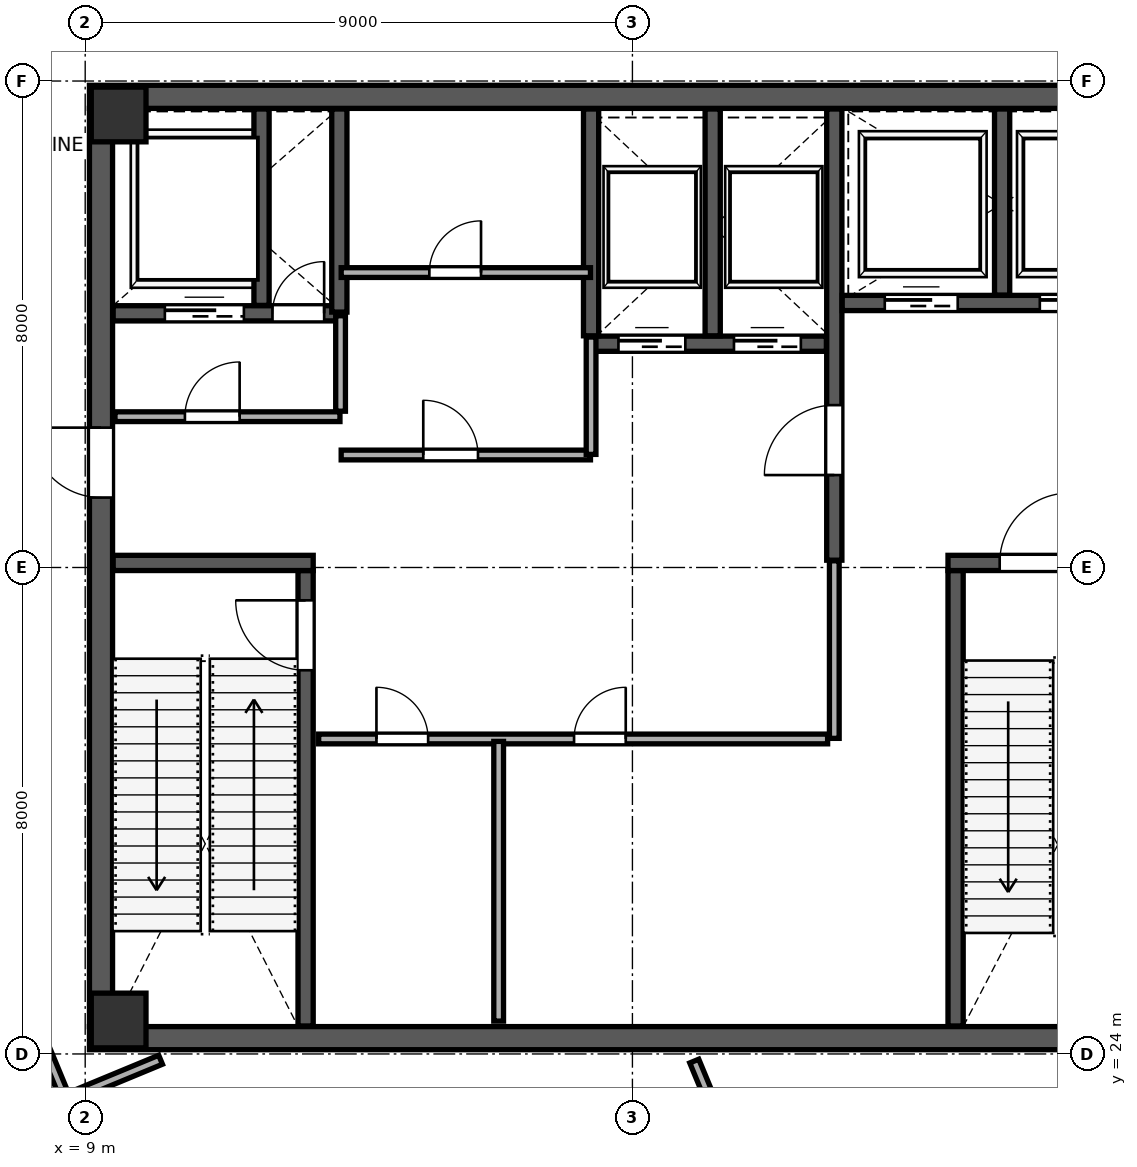
"""IFC4 building model, lengths in metres.
Left out: names, types, materials, properties, quantities, classifications, styles, units other than length and angle.
Written with IfcOpenShell. Run it as: python <this file> out.ifc"""

import sys

from ifc_helpers import new_model, si_unit, direction, frame, frame_2d, origin, origin_2d, place, context, subcontext, project, spatial, rectangle, extrude, source, transform, mapped, element, fill, save


model = new_model("IFC4")
c1 = context("Model", 3, precision=1e-05, world=origin(), true_north=direction((0.0, 1.0)))
c2 = subcontext(c1, "Body", "Model", "MODEL_VIEW")
j1 = project(units=[si_unit("LENGTHUNIT", "METRE"), si_unit("PLANEANGLEUNIT", "RADIAN")], contexts=[c1])
p1 = place(None, origin())
s1 = spatial("IfcSite", under=j1, at=p1, CompositionType="ELEMENT")
p2 = place(p1, origin())
s2 = spatial("IfcBuilding", under=s1, at=p2, CompositionType="ELEMENT")
p3 = place(p2, frame((0.0, 0.0, 349.2)))
s3 = spatial("IfcBuildingStorey", under=s2, at=p3, CompositionType="ELEMENT", Elevation=349.2)
m1 = source(origin(), c2, "Body", "SweptSolid", [
    extrude(rectangle(XDim=0.9, YDim=0.9, at=origin_2d()), origin(), (0.0, 0.0, 1.0), 5.999),
])
for number, where, z_axis, x_axis in (
    (1, (9.55, 24.55, 0.001), (0.0, 0.0, 1.0), (1.0, 0.0, 0.0)),
    (2, (9.55, 39.45, 0.001), (0.0, 0.0, 1.0), (1.0, 0.0, 0.0)),
):
    element("IfcColumn", number, at=place(p3, frame(where, z_axis=z_axis, x_axis=x_axis)), inside=s3, PredefinedType="COLUMN", context=c2, shape_type="MappedRepresentation", body=[
        mapped(m1, transform((0.0, 0.0, 0.0), scale=1.0)),
    ])
p4 = place(p3, frame((9.26, 24.45, 0.0), z_axis=(0.0, 0.0, 1.0), x_axis=(0.0, 1.0, 0.0)))
e3 = element("IfcWall", 3, at=p4, inside=s3, PredefinedType="SHEAR", context=c2, shape_type="SweptSolid", body=[
    extrude(rectangle(XDim=15.1, YDim=0.38, at=frame_2d((7.55, 0.0))), origin(), (0.0, 0.0, 1.0), 5.76),
])
p5 = place(p4, frame((8.7, 0.0, 0.0)))
e4 = element("IfcOpeningElement", 4, at=p5, cuts=e3, PredefinedType="OPENING", context=c2, shape_type="SweptSolid", body=[
    extrude(rectangle(XDim=1.15, YDim=2.2, at=frame_2d((0.575, 1.1))), frame((0.0, 0.2, 0.0), z_axis=(0.0, -1.0, 0.0), x_axis=(1.0, 0.0, 0.0)), (0.0, 0.0, 1.0), 0.4),
])
for number, where, z_axis, x_axis in (
    (5, (9.07, 24.26, 0.0), (0.0, 0.0, 1.0), (1.0, 0.0, 0.0)),
    (6, (9.07, 39.74, 0.0), (0.0, 0.0, 1.0), (1.0, 0.0, 0.0)),
):
    element("IfcWall", number, at=place(p3, frame(where, z_axis=z_axis, x_axis=x_axis)), inside=s3, PredefinedType="SHEAR", context=c2, shape_type="SweptSolid", body=[
        extrude(rectangle(XDim=17.86, YDim=0.38, at=frame_2d((8.93, 0.0))), origin(), (0.0, 0.0, 1.0), 5.76),
    ])
p6 = place(p3, frame((12.625, 24.46, 0.0), z_axis=(0.0, 0.0, 1.0), x_axis=(0.0, 1.0, 0.0)))
e7 = element("IfcWall", 7, at=p6, inside=s3, PredefinedType="SHEAR", context=c2, shape_type="SweptSolid", body=[
    extrude(rectangle(XDim=7.49, YDim=0.25, at=frame_2d((3.745, 0.0))), origin(), (0.0, 0.0, 1.0), 5.76),
])
p7 = place(p6, frame((5.85, 0.0, 0.0)))
e8 = element("IfcOpeningElement", 8, at=p7, cuts=e7, PredefinedType="OPENING", context=c2, shape_type="SweptSolid", body=[
    extrude(rectangle(XDim=1.15, YDim=2.2, at=frame_2d((0.575, 1.1))), frame((0.0, 0.135, 0.0), z_axis=(0.0, -1.0, 0.0), x_axis=(1.0, 0.0, 0.0)), (0.0, 0.0, 1.0), 0.27),
])
p8 = place(p3, frame((9.46, 32.075, 0.0), z_axis=(0.0, 0.0, 1.0), x_axis=(1.0, 0.0, 0.0)))
e9 = element("IfcWall", 9, at=p8, inside=s3, PredefinedType="SHEAR", context=c2, shape_type="SweptSolid", body=[
    extrude(rectangle(XDim=3.29, YDim=0.25, at=frame_2d((1.645, 0.0))), origin(), (0.0, 0.0, 1.0), 5.76),
])
p9 = place(p3, frame((23.315, 24.46, 0.0), z_axis=(0.0, 0.0, 1.0), x_axis=(0.0, 1.0, 0.0)))
e10 = element("IfcWall", 10, at=p9, inside=s3, PredefinedType="SHEAR", context=c2, shape_type="SweptSolid", body=[
    extrude(rectangle(XDim=7.49, YDim=0.25, at=frame_2d((3.745, 0.0))), origin(), (0.0, 0.0, 1.0), 5.76),
])
p10 = place(p3, frame((23.19, 32.075, 0.0), z_axis=(0.0, 0.0, 1.0), x_axis=(1.0, 0.0, 0.0)))
e11 = element("IfcWall", 11, at=p10, inside=s3, PredefinedType="SHEAR", context=c2, shape_type="SweptSolid", body=[
    extrude(rectangle(XDim=3.35, YDim=0.25, at=frame_2d((1.675, 0.0))), origin(), (0.0, 0.0, 1.0), 5.76),
])
p11 = place(p10, frame((0.85, 0.0, 0.0)))
e12 = element("IfcOpeningElement", 12, at=p11, cuts=e11, PredefinedType="OPENING", context=c2, shape_type="SweptSolid", body=[
    extrude(rectangle(XDim=1.15, YDim=2.2, at=frame_2d((0.575, 1.1))), frame((0.0, 0.135, 0.0), z_axis=(0.0, -1.0, 0.0), x_axis=(1.0, 0.0, 0.0)), (0.0, 0.0, 1.0), 0.27),
])
p12 = place(p3, frame((21.32, 32.12, 0.0), z_axis=(0.0, 0.0, 1.0), x_axis=(0.0, 1.0, 0.0)))
e13 = element("IfcWall", 13, at=p12, inside=s3, PredefinedType="SHEAR", context=c2, shape_type="SweptSolid", body=[
    extrude(rectangle(XDim=7.42, YDim=0.25, at=frame_2d((3.71, 0.0))), origin(), (0.0, 0.0, 1.0), 5.76),
])
p13 = place(p12, frame((1.4, 0.0, 0.0)))
e14 = element("IfcOpeningElement", 14, at=p13, cuts=e13, PredefinedType="OPENING", context=c2, shape_type="SweptSolid", body=[
    extrude(rectangle(XDim=1.15, YDim=2.2, at=frame_2d((0.575, 1.1))), frame((0.0, 0.135, 0.0), z_axis=(0.0, -1.0, 0.0), x_axis=(1.0, 0.0, 0.0)), (0.0, 0.0, 1.0), 0.27),
])
p14 = place(p3, frame((9.46, 36.18, 0.0), z_axis=(0.0, 0.0, 1.0), x_axis=(1.0, 0.0, 0.0)))
e15 = element("IfcWall", 15, at=p14, inside=s3, PredefinedType="SHEAR", context=c2, shape_type="SweptSolid", body=[
    extrude(rectangle(XDim=3.79, YDim=0.25, at=frame_2d((1.895, 0.0))), origin(), (0.0, 0.0, 1.0), 5.76),
])
p15 = place(p14, frame((2.62, 0.0, 0.0)))
e16 = element("IfcOpeningElement", 16, at=p15, cuts=e15, PredefinedType="OPENING", context=c2, shape_type="SweptSolid", body=[
    extrude(rectangle(XDim=0.85, YDim=2.1, at=frame_2d((0.425, 1.05))), frame((0.0, 0.135, 0.0), z_axis=(0.0, -1.0, 0.0), x_axis=(1.0, 0.0, 0.0)), (0.0, 0.0, 1.0), 0.27),
])
p16 = place(p14, frame((0.85, 0.0, 0.0)))
e17 = element("IfcOpeningElement", 17, at=p16, cuts=e15, PredefinedType="OPENING", context=c2, shape_type="SweptSolid", body=[
    extrude(rectangle(XDim=1.3, YDim=2.25, at=frame_2d((0.65, 1.125))), frame((0.0, 0.135, 0.0), z_axis=(0.0, -1.0, 0.0), x_axis=(1.0, 0.0, 0.0)), (0.0, 0.0, 1.0), 0.27),
])
p17 = place(p3, frame((11.9, 36.31, 0.0), z_axis=(0.0, 0.0, 1.0), x_axis=(0.0, 1.0, 0.0)))
e18 = element("IfcWall", 18, at=p17, inside=s3, PredefinedType="SHEAR", context=c2, shape_type="SweptSolid", body=[
    extrude(rectangle(XDim=3.23, YDim=0.25, at=frame_2d((1.615, 0.0))), origin(), (0.0, 0.0, 1.0), 5.76),
])
p18 = place(p3, frame((21.45, 36.35, 0.0), z_axis=(0.0, 0.0, 1.0), x_axis=(1.0, 0.0, 0.0)))
e19 = element("IfcWall", 19, at=p18, inside=s3, PredefinedType="SHEAR", context=c2, shape_type="SweptSolid", body=[
    extrude(rectangle(XDim=5.09, YDim=0.25, at=frame_2d((2.545, 0.0))), origin(), (0.0, 0.0, 1.0), 5.76),
])
p19 = place(p18, frame((0.7, 0.0, 0.0)))
e20 = element("IfcOpeningElement", 20, at=p19, cuts=e19, PredefinedType="OPENING", context=c2, shape_type="SweptSolid", body=[
    extrude(rectangle(XDim=1.2, YDim=2.2, at=frame_2d((0.6, 1.1))), frame((0.0, 0.135, 0.0), z_axis=(0.0, -1.0, 0.0), x_axis=(1.0, 0.0, 0.0)), (0.0, 0.0, 1.0), 0.27),
])
p20 = place(p18, frame((3.25, 0.0, 0.0)))
e21 = element("IfcOpeningElement", 21, at=p20, cuts=e19, PredefinedType="OPENING", context=c2, shape_type="SweptSolid", body=[
    extrude(rectangle(XDim=1.2, YDim=2.2, at=frame_2d((0.6, 1.1))), frame((0.0, 0.135, 0.0), z_axis=(0.0, -1.0, 0.0), x_axis=(1.0, 0.0, 0.0)), (0.0, 0.0, 1.0), 0.27),
])
p21 = place(p3, frame((24.08, 36.48, 0.0), z_axis=(0.0, 0.0, 1.0), x_axis=(0.0, 1.0, 0.0)))
e22 = element("IfcWall", 22, at=p21, inside=s3, PredefinedType="SHEAR", context=c2, shape_type="SweptSolid", body=[
    extrude(rectangle(XDim=3.06, YDim=0.25, at=frame_2d((1.53, 0.0))), origin(), (0.0, 0.0, 1.0), 5.76),
])
p22 = place(p3, frame((13.18, 36.2, 0.0), z_axis=(0.0, 0.0, 1.0), x_axis=(0.0, 1.0, 0.0)))
e23 = element("IfcWall", 23, at=p22, inside=s3, PredefinedType="SHEAR", context=c2, shape_type="SweptSolid", body=[
    extrude(rectangle(XDim=3.34, YDim=0.25, at=frame_2d((1.67, 0.0))), origin(), (0.0, 0.0, 1.0), 5.76),
])
p23 = place(p3, frame((17.32, 35.68, 0.0), z_axis=(0.0, 0.0, 1.0), x_axis=(1.0, 0.0, 0.0)))
e24 = element("IfcWall", 24, at=p23, inside=s3, PredefinedType="SHEAR", context=c2, shape_type="SweptSolid", body=[
    extrude(rectangle(XDim=3.87, YDim=0.25, at=frame_2d((1.935, 0.0))), origin(), (0.0, 0.0, 1.0), 5.76),
])
p24 = place(p23, frame((0.45, 0.0, 0.0)))
e25 = element("IfcOpeningElement", 25, at=p24, cuts=e24, PredefinedType="OPENING", context=c2, shape_type="SweptSolid", body=[
    extrude(rectangle(XDim=1.1, YDim=2.2, at=frame_2d((0.55, 1.1))), frame((0.0, 0.135, 0.0), z_axis=(0.0, -1.0, 0.0), x_axis=(1.0, 0.0, 0.0)), (0.0, 0.0, 1.0), 0.27),
])
p25 = place(p23, frame((2.35, 0.0, 0.0)))
e26 = element("IfcOpeningElement", 26, at=p25, cuts=e24, PredefinedType="OPENING", context=c2, shape_type="SweptSolid", body=[
    extrude(rectangle(XDim=1.1, YDim=2.2, at=frame_2d((0.55, 1.1))), frame((0.0, 0.135, 0.0), z_axis=(0.0, -1.0, 0.0), x_axis=(1.0, 0.0, 0.0)), (0.0, 0.0, 1.0), 0.27),
])
for number, where, z_axis, x_axis in (
    (27, (17.32, 35.81, 0.0), (0.0, 0.0, 1.0), (0.0, 1.0, 0.0)),
    (28, (19.32, 35.81, 0.0), (0.0, 0.0, 1.0), (0.0, 1.0, 0.0)),
):
    element("IfcWall", number, at=place(p3, frame(where, z_axis=z_axis, x_axis=x_axis)), inside=s3, PredefinedType="SHEAR", context=c2, shape_type="SweptSolid", body=[
        extrude(rectangle(XDim=3.73, YDim=0.25, at=frame_2d((1.865, 0.0))), origin(), (0.0, 0.0, 1.0), 5.76),
    ])
p26 = place(p3, frame((9.49, 34.48, 0.0), z_axis=(0.0, 0.0, 1.0), x_axis=(1.0, 0.0, 0.0)))
e29 = element("IfcWall", 29, at=p26, inside=s3, PredefinedType="PARTITIONING", context=c2, shape_type="SweptSolid", body=[
    extrude(rectangle(XDim=3.7, YDim=0.16, at=frame_2d((1.85, 0.0))), origin(), (0.0, 0.0, 1.0), 5.76),
])
p27 = place(p26, frame((1.15, 0.0, 0.0)))
e30 = element("IfcOpeningElement", 30, at=p27, cuts=e29, PredefinedType="OPENING", context=c2, shape_type="SweptSolid", body=[
    extrude(rectangle(XDim=0.9, YDim=2.15, at=frame_2d((0.45, 1.075))), frame((0.0, 0.09, 0.0), z_axis=(0.0, -1.0, 0.0), x_axis=(1.0, 0.0, 0.0)), (0.0, 0.0, 1.0), 0.18),
])
p28 = place(p3, frame((13.2, 34.57, 0.0), z_axis=(0.0, 0.0, 1.0), x_axis=(0.0, 1.0, 0.0)))
e31 = element("IfcWall", 31, at=p28, inside=s3, PredefinedType="PARTITIONING", context=c2, shape_type="SweptSolid", body=[
    extrude(rectangle(XDim=1.57, YDim=0.16, at=frame_2d((0.785, 0.0))), origin(), (0.0, 0.0, 1.0), 5.76),
])
p29 = place(p3, frame((13.21, 33.85, 0.0), z_axis=(0.0, 0.0, 1.0), x_axis=(1.0, 0.0, 0.0)))
e32 = element("IfcWall", 32, at=p29, inside=s3, PredefinedType="PARTITIONING", context=c2, shape_type="SweptSolid", body=[
    extrude(rectangle(XDim=4.1, YDim=0.16, at=frame_2d((2.05, 0.0))), origin(), (0.0, 0.0, 1.0), 5.76),
])
p30 = place(p29, frame((1.35, 0.0, 0.0)))
e33 = element("IfcOpeningElement", 33, at=p30, cuts=e32, PredefinedType="OPENING", context=c2, shape_type="SweptSolid", body=[
    extrude(rectangle(XDim=0.9, YDim=2.15, at=frame_2d((0.45, 1.075))), frame((0.0, 0.09, 0.0), z_axis=(0.0, -1.0, 0.0), x_axis=(1.0, 0.0, 0.0)), (0.0, 0.0, 1.0), 0.18),
])
p31 = place(p3, frame((17.32, 33.86, 0.0), z_axis=(0.0, 0.0, 1.0), x_axis=(0.0, 1.0, 0.0)))
e34 = element("IfcWall", 34, at=p31, inside=s3, PredefinedType="PARTITIONING", context=c2, shape_type="SweptSolid", body=[
    extrude(rectangle(XDim=1.93, YDim=0.16, at=frame_2d((0.965, 0.0))), origin(), (0.0, 0.0, 1.0), 5.76),
])
p32 = place(p3, frame((13.21, 36.85, 0.0), z_axis=(0.0, 0.0, 1.0), x_axis=(1.0, 0.0, 0.0)))
e35 = element("IfcWall", 35, at=p32, inside=s3, PredefinedType="PARTITIONING", context=c2, shape_type="SweptSolid", body=[
    extrude(rectangle(XDim=4.1, YDim=0.16, at=frame_2d((2.05, 0.0))), origin(), (0.0, 0.0, 1.0), 5.76),
])
p33 = place(p32, frame((1.45, 0.0, 0.0)))
e36 = element("IfcOpeningElement", 36, at=p33, cuts=e35, PredefinedType="OPENING", context=c2, shape_type="SweptSolid", body=[
    extrude(rectangle(XDim=0.85, YDim=2.1, at=frame_2d((0.425, 1.05))), frame((0.0, 0.09, 0.0), z_axis=(0.0, -1.0, 0.0), x_axis=(1.0, 0.0, 0.0)), (0.0, 0.0, 1.0), 0.18),
])
p34 = place(p3, frame((12.84, 29.18, 0.0), z_axis=(0.0, 0.0, 1.0), x_axis=(1.0, 0.0, 0.0)))
e37 = element("IfcWall", 37, at=p34, inside=s3, PredefinedType="PARTITIONING", context=c2, shape_type="SweptSolid", body=[
    extrude(rectangle(XDim=8.37, YDim=0.16, at=frame_2d((4.185, 0.0))), origin(), (0.0, 0.0, 1.0), 5.76),
])
p35 = place(p34, frame((0.95, 0.0, 0.0)))
e38 = element("IfcOpeningElement", 38, at=p35, cuts=e37, PredefinedType="OPENING", context=c2, shape_type="SweptSolid", body=[
    extrude(rectangle(XDim=0.85, YDim=2.1, at=frame_2d((0.425, 1.05))), frame((0.0, 0.09, 0.0), z_axis=(0.0, -1.0, 0.0), x_axis=(1.0, 0.0, 0.0)), (0.0, 0.0, 1.0), 0.18),
])
p36 = place(p34, frame((4.2, 0.0, 0.0)))
e39 = element("IfcOpeningElement", 39, at=p36, cuts=e37, PredefinedType="OPENING", context=c2, shape_type="SweptSolid", body=[
    extrude(rectangle(XDim=0.85, YDim=2.1, at=frame_2d((0.425, 1.05))), frame((0.0, 0.09, 0.0), z_axis=(0.0, -1.0, 0.0), x_axis=(1.0, 0.0, 0.0)), (0.0, 0.0, 1.0), 0.18),
])
p37 = place(p3, frame((15.8, 24.54, 0.0), z_axis=(0.0, 0.0, 1.0), x_axis=(0.0, 1.0, 0.0)))
e40 = element("IfcWall", 40, at=p37, inside=s3, PredefinedType="PARTITIONING", context=c2, shape_type="SweptSolid", body=[
    extrude(rectangle(XDim=4.6, YDim=0.16, at=frame_2d((2.3, 0.0))), origin(), (0.0, 0.0, 1.0), 5.76),
])
p38 = place(p3, frame((21.32, 29.19, 0.0), z_axis=(0.0, 0.0, 1.0), x_axis=(0.0, 1.0, 0.0)))
e41 = element("IfcWall", 41, at=p38, inside=s3, PredefinedType="PARTITIONING", context=c2, shape_type="SweptSolid", body=[
    extrude(rectangle(XDim=2.92, YDim=0.16, at=frame_2d((1.46, 0.0))), origin(), (0.0, 0.0, 1.0), 5.76),
])
p39 = place(p3, frame((3.923, 34.742, 0.0), z_axis=(0.0, 0.0, 1.0), x_axis=(0.382686508818, -0.923878258197, 0.0)))
e42 = element("IfcWall", 42, at=p39, inside=s3, PredefinedType="PARTITIONING", context=c2, shape_type="SweptSolid", body=[
    extrude(rectangle(XDim=12.39, YDim=0.16, at=frame_2d((6.195, 0.0))), origin(), (0.0, 0.0, 1.0), 5.76),
])
p40 = place(p3, frame((8.716, 23.274, 0.0), z_axis=(0.0, 0.0, 1.0), x_axis=(0.92386344226, 0.382722275359, 0.0)))
e43 = element("IfcWall", 43, at=p40, inside=s3, PredefinedType="PARTITIONING", context=c2, shape_type="SweptSolid", body=[
    extrude(rectangle(XDim=1.649, YDim=0.16, at=frame_2d((0.824, 0.0))), origin(), (0.0, 0.0, 1.0), 5.76),
])
p41 = place(p3, frame((19.017, 23.883, 0.0), z_axis=(0.0, 0.0, 1.0), x_axis=(0.382749810298, -0.923852035078, 0.0)))
e44 = element("IfcWall", 44, at=p41, inside=s3, PredefinedType="PARTITIONING", context=c2, shape_type="SweptSolid", body=[
    extrude(rectangle(XDim=4.081, YDim=0.16, at=frame_2d((2.041, 0.0))), origin(), (0.0, 0.0, 1.0), 5.76),
])
p42 = place(p3, frame((4.145, 38.936, 0.0), z_axis=(0.0, 0.0, 1.0), x_axis=(0.923878093623, 0.38268690613, 0.0)))
e45 = element("IfcWall", 45, at=p42, inside=s3, PredefinedType="PARTITIONING", context=c2, shape_type="SweptSolid", body=[
    extrude(rectangle(XDim=5.962, YDim=0.1, at=frame_2d((2.981, 0.0))), origin(), (0.0, 0.0, 1.0), 5.76),
])
p43 = place(p3, frame((22.054, 20.68, 0.0), z_axis=(0.0, 0.0, 1.0), x_axis=(0.923880950116, 0.382680009946, 0.0)))
e46 = element("IfcWall", 46, at=p43, inside=s3, PredefinedType="PARTITIONING", context=c2, shape_type="SweptSolid", body=[
    extrude(rectangle(XDim=19.84, YDim=0.16, at=frame_2d((9.92, 0.0))), origin(), (0.0, 0.0, 1.0), 5.76),
])
m2 = source(origin(), c2, "Body", "SweptSolid", [
    extrude(rectangle(XDim=1.15, YDim=2.2, at=frame_2d((0.575, 1.1))), frame((0.0, 0.025, 0.0), z_axis=(0.0, -1.0, 0.0), x_axis=(1.0, 0.0, 0.0)), (0.0, 0.0, 1.0), 0.05),
])
p44 = place(p7, origin())
e47 = element("IfcDoor", 47, at=p44, inside=s3, OperationType="SINGLE_SWING_RIGHT", PredefinedType="DOOR", context=c2, shape_type="MappedRepresentation", body=[
    mapped(m2, transform((0.0, 0.0, 0.0), scale=1.0)),
])
fill(e8, e47)
m3 = source(origin(), c2, "Body", "SweptSolid", [
    extrude(rectangle(XDim=1.15, YDim=2.2, at=frame_2d((0.575, 1.1))), frame((0.0, 0.025, 0.0), z_axis=(0.0, -1.0, 0.0), x_axis=(1.0, 0.0, 0.0)), (0.0, 0.0, 1.0), 0.05),
])
p45 = place(p13, origin())
e48 = element("IfcDoor", 48, at=p45, inside=s3, OperationType="SINGLE_SWING_LEFT", PredefinedType="DOOR", context=c2, shape_type="MappedRepresentation", body=[
    mapped(m3, transform((0.0, 0.0, 0.0), scale=1.0)),
])
fill(e14, e48)
p46 = place(p11, origin())
e49 = element("IfcDoor", 49, at=p46, inside=s3, OperationType="SINGLE_SWING_RIGHT", PredefinedType="DOOR", context=c2, shape_type="MappedRepresentation", body=[
    mapped(m2, transform((0.0, 0.0, 0.0), scale=1.0)),
])
fill(e12, e49)
p47 = place(p5, origin())
e50 = element("IfcDoor", 50, at=p47, inside=s3, OperationType="SINGLE_SWING_RIGHT", PredefinedType="DOOR", context=c2, shape_type="MappedRepresentation", body=[
    mapped(m3, transform((0.0, 0.0, 0.0), scale=1.0)),
])
fill(e4, e50)
m4 = source(origin(), c2, "Body", "SweptSolid", [
    extrude(rectangle(XDim=0.85, YDim=2.1, at=frame_2d((0.425, 1.05))), frame((0.0, 0.025, 0.0), z_axis=(0.0, -1.0, 0.0), x_axis=(1.0, 0.0, 0.0)), (0.0, 0.0, 1.0), 0.05),
])
p48 = place(p15, origin())
e51 = element("IfcDoor", 51, at=p48, inside=s3, OperationType="SINGLE_SWING_RIGHT", PredefinedType="DOOR", context=c2, shape_type="MappedRepresentation", body=[
    mapped(m4, transform((0.0, 0.0, 0.0), scale=1.0)),
])
fill(e16, e51)
m5 = source(origin(), c2, "Body", "SweptSolid", [
    extrude(rectangle(XDim=1.1, YDim=2.2, at=frame_2d((0.55, 1.1))), frame((0.0, 0.025, 0.0), z_axis=(0.0, -1.0, 0.0), x_axis=(1.0, 0.0, 0.0)), (0.0, 0.0, 1.0), 0.05),
])
p49 = place(p24, origin())
e52 = element("IfcDoor", 52, at=p49, inside=s3, OperationType="SLIDING_TO_LEFT", PredefinedType="DOOR", context=c2, shape_type="MappedRepresentation", body=[
    mapped(m5, transform((0.0, 0.0, 0.0), scale=1.0)),
])
fill(e25, e52)
p50 = place(p25, origin())
e53 = element("IfcDoor", 53, at=p50, inside=s3, OperationType="SLIDING_TO_RIGHT", PredefinedType="DOOR", context=c2, shape_type="MappedRepresentation", body=[
    mapped(m5, transform((0.0, 0.0, 0.0), scale=1.0)),
])
fill(e26, e53)
m6 = source(origin(), c2, "Body", "SweptSolid", [
    extrude(rectangle(XDim=1.2, YDim=2.2, at=frame_2d((0.6, 1.1))), frame((0.0, 0.025, 0.0), z_axis=(0.0, -1.0, 0.0), x_axis=(1.0, 0.0, 0.0)), (0.0, 0.0, 1.0), 0.05),
])
p51 = place(p19, origin())
e54 = element("IfcDoor", 54, at=p51, inside=s3, OperationType="SLIDING_TO_LEFT", PredefinedType="DOOR", context=c2, shape_type="MappedRepresentation", body=[
    mapped(m6, transform((0.0, 0.0, 0.0), scale=1.0)),
])
fill(e20, e54)
p52 = place(p20, origin())
e55 = element("IfcDoor", 55, at=p52, inside=s3, OperationType="SLIDING_TO_RIGHT", PredefinedType="DOOR", context=c2, shape_type="MappedRepresentation", body=[
    mapped(m6, transform((0.0, 0.0, 0.0), scale=1.0)),
])
fill(e21, e55)
m7 = source(origin(), c2, "Body", "SweptSolid", [
    extrude(rectangle(XDim=1.3, YDim=2.25, at=frame_2d((0.65, 1.125))), frame((0.0, 0.025, 0.0), z_axis=(0.0, -1.0, 0.0), x_axis=(1.0, 0.0, 0.0)), (0.0, 0.0, 1.0), 0.05),
])
p53 = place(p16, origin())
e56 = element("IfcDoor", 56, at=p53, inside=s3, OperationType="SLIDING_TO_LEFT", PredefinedType="DOOR", context=c2, shape_type="MappedRepresentation", body=[
    mapped(m7, transform((0.0, 0.0, 0.0), scale=1.0)),
])
fill(e17, e56)
m8 = source(origin(), c2, "Body", "SweptSolid", [
    extrude(rectangle(XDim=0.9, YDim=2.15, at=frame_2d((0.45, 1.075))), frame((0.0, 0.025, 0.0), z_axis=(0.0, -1.0, 0.0), x_axis=(1.0, 0.0, 0.0)), (0.0, 0.0, 1.0), 0.05),
])
p54 = place(p27, origin())
e57 = element("IfcDoor", 57, at=p54, inside=s3, OperationType="SINGLE_SWING_RIGHT", PredefinedType="DOOR", context=c2, shape_type="MappedRepresentation", body=[
    mapped(m8, transform((0.0, 0.0, 0.0), scale=1.0)),
])
fill(e30, e57)
p55 = place(p30, origin())
e58 = element("IfcDoor", 58, at=p55, inside=s3, OperationType="SINGLE_SWING_LEFT", PredefinedType="DOOR", context=c2, shape_type="MappedRepresentation", body=[
    mapped(m8, transform((0.0, 0.0, 0.0), scale=1.0)),
])
fill(e33, e58)
p56 = place(p33, origin())
e59 = element("IfcDoor", 59, at=p56, inside=s3, OperationType="SINGLE_SWING_RIGHT", PredefinedType="DOOR", context=c2, shape_type="MappedRepresentation", body=[
    mapped(m4, transform((0.0, 0.0, 0.0), scale=1.0)),
])
fill(e36, e59)
p57 = place(p35, origin())
e60 = element("IfcDoor", 60, at=p57, inside=s3, OperationType="SINGLE_SWING_LEFT", PredefinedType="DOOR", context=c2, shape_type="MappedRepresentation", body=[
    mapped(m4, transform((0.0, 0.0, 0.0), scale=1.0)),
])
fill(e38, e60)
p58 = place(p36, origin())
e61 = element("IfcDoor", 61, at=p58, inside=s3, OperationType="SINGLE_SWING_RIGHT", PredefinedType="DOOR", context=c2, shape_type="MappedRepresentation", body=[
    mapped(m4, transform((0.0, 0.0, 0.0), scale=1.0)),
])
fill(e39, e61)
save(model, sys.argv[1])
